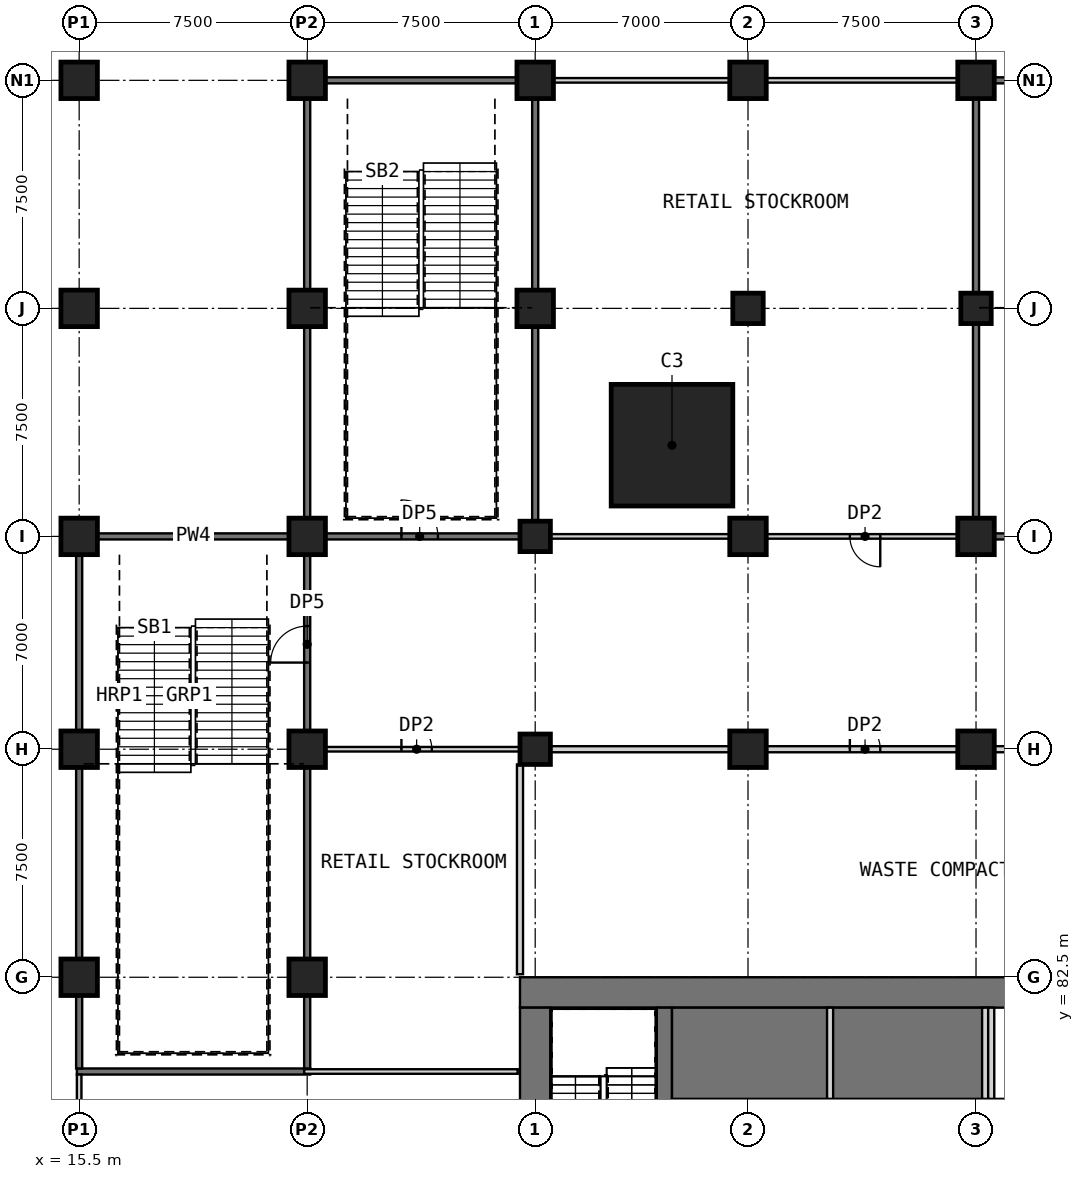
"""IFC4 building model, lengths in metres.
Left out: names, types, materials, properties, quantities, classifications, styles, units other than length and angle.
Written with IfcOpenShell. Run it as: python <this file> out.ifc"""

import sys

from ifc_helpers import new_model, si_unit, direction, frame, frame_2d, origin, origin_2d, place, context, subcontext, project, spatial, rectangle, extrude, element, fill, save


model = new_model("IFC4")
c1 = context("Model", 3, precision=1e-05, world=origin(), true_north=direction((0.0, 1.0)))
c2 = subcontext(c1, "Body", "Model", "MODEL_VIEW")
j1 = project(units=[si_unit("LENGTHUNIT", "METRE"), si_unit("PLANEANGLEUNIT", "RADIAN")], contexts=[c1])
p1 = place(None, origin())
s1 = spatial("IfcSite", under=j1, at=p1, CompositionType="ELEMENT")
p2 = place(p1, origin())
s2 = spatial("IfcBuilding", under=s1, at=p2, CompositionType="ELEMENT")
p3 = place(p2, frame((0.0, 0.0, -6.0)))
s3 = spatial("IfcBuildingStorey", under=s2, at=p3, CompositionType="ELEMENT", Elevation=-6.0)
for number, where, z_axis, x_axis in (
    (1, (30.5, 90.0, 0.0), (0.0, 0.0, 1.0), (1.0, 0.0, 0.0)),
    (2, (30.5, 97.0, 0.0), (0.0, 0.0, 1.0), (1.0, 0.0, 0.0)),
):
    element("IfcColumn", number, at=place(p3, frame(where, z_axis=z_axis, x_axis=x_axis)), inside=s3, PredefinedType="COLUMN", context=c2, shape_type="SweptSolid", body=[
        extrude(rectangle(XDim=1.0, YDim=1.0, at=origin_2d()), origin(), (0.0, 0.0, 1.0), 6.0),
    ])
for number, where, z_axis, x_axis in (
    (3, (37.5, 90.0, 0.0), (0.0, 0.0, 1.0), (1.0, 0.0, 0.0)),
    (4, (37.5, 97.0, 0.0), (0.0, 0.0, 1.0), (1.0, 0.0, 0.0)),
):
    element("IfcColumn", number, at=place(p3, frame(where, z_axis=z_axis, x_axis=x_axis)), inside=s3, PredefinedType="COLUMN", context=c2, shape_type="SweptSolid", body=[
        extrude(rectangle(XDim=1.2, YDim=1.2, at=origin_2d()), origin(), (0.0, 0.0, 1.0), 6.0),
    ])
p4 = place(p3, frame((37.5, 104.5, 0.0), z_axis=(0.0, 0.0, 1.0), x_axis=(1.0, 0.0, 0.0)))
e5 = element("IfcColumn", 5, at=p4, inside=s3, PredefinedType="COLUMN", context=c2, shape_type="SweptSolid", body=[
    extrude(rectangle(XDim=1.0, YDim=1.0, at=origin_2d()), origin(), (0.0, 0.0, 1.0), 6.0),
])
for number, where, z_axis, x_axis in (
    (6, (45.0, 90.0, 0.0), (0.0, 0.0, 1.0), (1.0, 0.0, 0.0)),
    (7, (45.0, 97.0, 0.0), (0.0, 0.0, 1.0), (1.0, 0.0, 0.0)),
):
    element("IfcColumn", number, at=place(p3, frame(where, z_axis=z_axis, x_axis=x_axis)), inside=s3, PredefinedType="COLUMN", context=c2, shape_type="SweptSolid", body=[
        extrude(rectangle(XDim=1.2, YDim=1.2, at=origin_2d()), origin(), (0.0, 0.0, 1.0), 6.0),
    ])
p5 = place(p3, frame((45.0, 104.5, 0.0), z_axis=(0.0, 0.0, 1.0), x_axis=(1.0, 0.0, 0.0)))
e8 = element("IfcColumn", 8, at=p5, inside=s3, PredefinedType="COLUMN", context=c2, shape_type="SweptSolid", body=[
    extrude(rectangle(XDim=1.0, YDim=1.0, at=origin_2d()), origin(), (0.0, 0.0, 1.0), 6.0),
])
p6 = place(p3, frame((35.0, 100.0, 0.0), z_axis=(0.0, 0.0, 1.0), x_axis=(1.0, 0.0, 0.0)))
e9 = element("IfcColumn", 9, at=p6, inside=s3, PredefinedType="COLUMN", context=c2, shape_type="SweptSolid", body=[
    extrude(rectangle(XDim=4.0, YDim=4.0, at=origin_2d()), origin(), (0.0, 0.0, 1.0), 6.0),
])
for number, where, z_axis, x_axis in (
    (10, (15.5, 82.5, 0.0), (0.0, 0.0, 1.0), (1.0, 0.0, 0.0)),
    (11, (15.5, 90.0, 0.0), (0.0, 0.0, 1.0), (1.0, 0.0, 0.0)),
    (12, (15.5, 97.0, 0.0), (0.0, 0.0, 1.0), (1.0, 0.0, 0.0)),
    (13, (15.5, 104.5, 0.0), (0.0, 0.0, 1.0), (1.0, 0.0, 0.0)),
    (14, (15.5, 112.0, 0.0), (0.0, 0.0, 1.0), (1.0, 0.0, 0.0)),
    (15, (23.0, 82.5, 0.0), (0.0, 0.0, 1.0), (1.0, 0.0, 0.0)),
    (16, (23.0, 90.0, 0.0), (0.0, 0.0, 1.0), (1.0, 0.0, 0.0)),
    (17, (23.0, 97.0, 0.0), (0.0, 0.0, 1.0), (1.0, 0.0, 0.0)),
    (18, (23.0, 104.5, 0.0), (0.0, 0.0, 1.0), (1.0, 0.0, 0.0)),
    (19, (23.0, 112.0, 0.0), (0.0, 0.0, 1.0), (1.0, 0.0, 0.0)),
    (20, (30.5, 104.5, 0.0), (0.0, 0.0, 1.0), (1.0, 0.0, 0.0)),
    (21, (30.5, 112.0, 0.0), (0.0, 0.0, 1.0), (1.0, 0.0, 0.0)),
    (22, (37.5, 112.0, 0.0), (0.0, 0.0, 1.0), (1.0, 0.0, 0.0)),
    (23, (45.0, 112.0, 0.0), (0.0, 0.0, 1.0), (1.0, 0.0, 0.0)),
):
    element("IfcColumn", number, at=place(p3, frame(where, z_axis=z_axis, x_axis=x_axis)), inside=s3, PredefinedType="COLUMN", context=c2, shape_type="SweptSolid", body=[
        extrude(rectangle(XDim=1.2, YDim=1.2, at=origin_2d()), origin(), (0.0, 0.0, 1.0), 6.0),
    ])
p7 = place(p3, frame((30.0, 82.0, 0.0), z_axis=(0.0, 0.0, 1.0), x_axis=(1.0, 0.0, 0.0)))
e24 = element("IfcWall", 24, at=p7, inside=s3, PredefinedType="SHEAR", context=c2, shape_type="SweptSolid", body=[
    extrude(rectangle(XDim=30.0, YDim=1.0, at=frame_2d((15.0, 0.0))), origin(), (0.0, 0.0, 1.0), 6.0),
])
p8 = place(p3, frame((30.5, 61.0, 0.0), z_axis=(0.0, 0.0, 1.0), x_axis=(0.0, 1.0, 0.0)))
e25 = element("IfcWall", 25, at=p8, inside=s3, PredefinedType="SHEAR", context=c2, shape_type="SweptSolid", body=[
    extrude(rectangle(XDim=20.5, YDim=1.0, at=frame_2d((10.25, 0.0))), origin(), (0.0, 0.0, 1.0), 6.0),
])
p9 = place(p3, frame((34.75, 78.3, 0.0), z_axis=(0.0, 0.0, 1.0), x_axis=(0.0, 1.0, 0.0)))
e26 = element("IfcWall", 26, at=p9, inside=s3, PredefinedType="SHEAR", context=c2, shape_type="SweptSolid", body=[
    extrude(rectangle(XDim=3.2, YDim=0.5, at=frame_2d((1.6, 0.0))), origin(), (0.0, 0.0, 1.0), 6.0),
])
p10 = place(p3, frame((35.0, 79.9, 0.0), z_axis=(0.0, 0.0, 1.0), x_axis=(1.0, 0.0, 0.0)))
e27 = element("IfcWall", 27, at=p10, inside=s3, PredefinedType="SOLIDWALL", context=c2, shape_type="SweptSolid", body=[
    extrude(rectangle(XDim=10.4, YDim=3.2, at=frame_2d((5.2, 0.0))), origin(), (0.0, 0.0, 1.0), 4.4),
])
p11 = place(p3, frame((35.0, 78.4, 4.4), z_axis=(0.0, 0.0, 1.0), x_axis=(1.0, 0.0, 0.0)))
e28 = element("IfcWall", 28, at=p11, inside=s3, PredefinedType="SOLIDWALL", context=c2, shape_type="SweptSolid", body=[
    extrude(rectangle(XDim=10.4, YDim=0.2, at=frame_2d((5.2, 0.0))), origin(), (0.0, 0.0, 1.0), 1.6),
])
for number, where, z_axis, x_axis in (
    (29, (40.2, 78.5, 4.4), (0.0, 0.0, 1.0), (0.0, 1.0, 0.0)),
    (30, (45.3, 78.5, 4.4), (0.0, 0.0, 1.0), (0.0, 1.0, 0.0)),
):
    element("IfcWall", number, at=place(p3, frame(where, z_axis=z_axis, x_axis=x_axis)), inside=s3, PredefinedType="SOLIDWALL", context=c2, shape_type="SweptSolid", body=[
        extrude(rectangle(XDim=3.0, YDim=0.2, at=frame_2d((1.5, 0.0))), origin(), (0.0, 0.0, 1.0), 1.6),
    ])
p12 = place(p3, frame((45.4, 78.4, 0.0), z_axis=(0.0, 0.0, 1.0), x_axis=(1.0, 0.0, 0.0)))
e31 = element("IfcWall", 31, at=p12, inside=s3, PredefinedType="SOLIDWALL", context=c2, shape_type="SweptSolid", body=[
    extrude(rectangle(XDim=5.2, YDim=0.2, at=frame_2d((2.6, 0.0))), origin(), (0.0, 0.0, 1.0), 6.0),
])
p13 = place(p12, frame((0.75, 0.0, 0.0)))
e32 = element("IfcOpeningElement", 32, at=p13, cuts=e31, PredefinedType="OPENING", context=c2, shape_type="SweptSolid", body=[
    extrude(rectangle(XDim=1.1, YDim=2.1, at=frame_2d((0.55, 1.05))), frame((0.0, 0.11, 0.0), z_axis=(0.0, -1.0, 0.0), x_axis=(1.0, 0.0, 0.0)), (0.0, 0.0, 1.0), 0.22),
])
p14 = place(p12, frame((3.35, 0.0, 0.0)))
e33 = element("IfcOpeningElement", 33, at=p14, cuts=e31, PredefinedType="OPENING", context=c2, shape_type="SweptSolid", body=[
    extrude(rectangle(XDim=1.1, YDim=2.1, at=frame_2d((0.55, 1.05))), frame((0.0, 0.11, 0.0), z_axis=(0.0, -1.0, 0.0), x_axis=(1.0, 0.0, 0.0)), (0.0, 0.0, 1.0), 0.22),
])
p15 = place(p3, frame((45.5, 78.5, 0.0), z_axis=(0.0, 0.0, 1.0), x_axis=(0.0, 1.0, 0.0)))
e34 = element("IfcWall", 34, at=p15, inside=s3, PredefinedType="SOLIDWALL", context=c2, shape_type="SweptSolid", body=[
    extrude(rectangle(XDim=3.0, YDim=0.2, at=frame_2d((1.5, 0.0))), origin(), (0.0, 0.0, 1.0), 6.0),
])
p16 = place(p3, frame((23.6, 90.0, 0.0), z_axis=(0.0, 0.0, 1.0), x_axis=(1.0, 0.0, 0.0)))
e35 = element("IfcWall", 35, at=p16, inside=s3, PredefinedType="PARTITIONING", context=c2, shape_type="SweptSolid", body=[
    extrude(rectangle(XDim=6.4, YDim=0.15, at=frame_2d((3.2, 0.0))), origin(), (0.0, 0.0, 1.0), 5.7),
])
p17 = place(p16, frame((2.5, 0.0, 0.0)))
e36 = element("IfcOpeningElement", 36, at=p17, cuts=e35, PredefinedType="OPENING", context=c2, shape_type="SweptSolid", body=[
    extrude(rectangle(XDim=1.0, YDim=2.1, at=frame_2d((0.5, 1.05))), frame((0.0, 0.085, 0.0), z_axis=(0.0, -1.0, 0.0), x_axis=(1.0, 0.0, 0.0)), (0.0, 0.0, 1.0), 0.17),
])
p18 = place(p3, frame((31.0, 90.0, 0.0), z_axis=(0.0, 0.0, 1.0), x_axis=(1.0, 0.0, 0.0)))
e37 = element("IfcWall", 37, at=p18, inside=s3, PredefinedType="PARTITIONING", context=c2, shape_type="SweptSolid", body=[
    extrude(rectangle(XDim=5.9, YDim=0.2, at=frame_2d((2.95, 0.0))), origin(), (0.0, 0.0, 1.0), 5.7),
])
p19 = place(p3, frame((38.1, 90.0, 0.0), z_axis=(0.0, 0.0, 1.0), x_axis=(1.0, 0.0, 0.0)))
e38 = element("IfcWall", 38, at=p19, inside=s3, PredefinedType="PARTITIONING", context=c2, shape_type="SweptSolid", body=[
    extrude(rectangle(XDim=6.3, YDim=0.2, at=frame_2d((3.15, 0.0))), origin(), (0.0, 0.0, 1.0), 5.7),
])
p20 = place(p19, frame((2.75, 0.0, 0.0)))
e39 = element("IfcOpeningElement", 39, at=p20, cuts=e38, PredefinedType="OPENING", context=c2, shape_type="SweptSolid", body=[
    extrude(rectangle(XDim=1.0, YDim=2.1, at=frame_2d((0.5, 1.05))), frame((0.0, 0.11, 0.0), z_axis=(0.0, -1.0, 0.0), x_axis=(1.0, 0.0, 0.0)), (0.0, 0.0, 1.0), 0.22),
])
p21 = place(p3, frame((45.6, 90.0, 0.0), z_axis=(0.0, 0.0, 1.0), x_axis=(1.0, 0.0, 0.0)))
e40 = element("IfcWall", 40, at=p21, inside=s3, PredefinedType="PARTITIONING", context=c2, shape_type="SweptSolid", body=[
    extrude(rectangle(XDim=6.3, YDim=0.2, at=frame_2d((3.15, 0.0))), origin(), (0.0, 0.0, 1.0), 5.7),
])
p22 = place(p3, frame((16.1, 97.0, 0.0), z_axis=(0.0, 0.0, 1.0), x_axis=(1.0, 0.0, 0.0)))
e41 = element("IfcWall", 41, at=p22, inside=s3, PredefinedType="SHEAR", context=c2, shape_type="SweptSolid", body=[
    extrude(rectangle(XDim=6.3, YDim=0.2, at=frame_2d((3.15, 0.0))), origin(), (0.0, 0.0, 1.0), 5.7),
])
p23 = place(p3, frame((23.6, 97.0, 0.0), z_axis=(0.0, 0.0, 1.0), x_axis=(1.0, 0.0, 0.0)))
e42 = element("IfcWall", 42, at=p23, inside=s3, PredefinedType="SHEAR", context=c2, shape_type="SweptSolid", body=[
    extrude(rectangle(XDim=6.4, YDim=0.2, at=frame_2d((3.2, 0.0))), origin(), (0.0, 0.0, 1.0), 5.7),
])
p24 = place(p23, frame((2.5, 0.0, 0.0)))
e43 = element("IfcOpeningElement", 43, at=p24, cuts=e42, PredefinedType="OPENING", context=c2, shape_type="SweptSolid", body=[
    extrude(rectangle(XDim=1.2, YDim=2.1, at=frame_2d((0.6, 1.05))), frame((0.0, 0.11, 0.0), z_axis=(0.0, -1.0, 0.0), x_axis=(1.0, 0.0, 0.0)), (0.0, 0.0, 1.0), 0.22),
])
p25 = place(p3, frame((31.0, 97.0, 0.0), z_axis=(0.0, 0.0, 1.0), x_axis=(1.0, 0.0, 0.0)))
e44 = element("IfcWall", 44, at=p25, inside=s3, PredefinedType="PARTITIONING", context=c2, shape_type="SweptSolid", body=[
    extrude(rectangle(XDim=5.9, YDim=0.15, at=frame_2d((2.95, 0.0))), origin(), (0.0, 0.0, 1.0), 5.7),
])
p26 = place(p3, frame((44.4, 97.0, 0.0), z_axis=(0.0, 0.0, 1.0), x_axis=(-1.0, 0.0, 0.0)))
e45 = element("IfcWall", 45, at=p26, inside=s3, PredefinedType="PARTITIONING", context=c2, shape_type="SweptSolid", body=[
    extrude(rectangle(XDim=6.3, YDim=0.15, at=frame_2d((3.15, 0.0))), origin(), (0.0, 0.0, 1.0), 5.7),
])
p27 = place(p26, frame((2.55, 0.0, 0.0)))
e46 = element("IfcOpeningElement", 46, at=p27, cuts=e45, PredefinedType="OPENING", context=c2, shape_type="SweptSolid", body=[
    extrude(rectangle(XDim=1.0, YDim=2.1, at=frame_2d((0.5, 1.05))), frame((0.0, 0.085, 0.0), z_axis=(0.0, -1.0, 0.0), x_axis=(1.0, 0.0, 0.0)), (0.0, 0.0, 1.0), 0.17),
])
p28 = place(p3, frame((45.6, 97.0, 0.0), z_axis=(0.0, 0.0, 1.0), x_axis=(1.0, 0.0, 0.0)))
e47 = element("IfcWall", 47, at=p28, inside=s3, PredefinedType="SHEAR", context=c2, shape_type="SweptSolid", body=[
    extrude(rectangle(XDim=6.3, YDim=0.2, at=frame_2d((3.15, 0.0))), origin(), (0.0, 0.0, 1.0), 5.7),
])
p29 = place(p28, frame((2.5, 0.0, 0.0)))
e48 = element("IfcOpeningElement", 48, at=p29, cuts=e47, PredefinedType="OPENING", context=c2, shape_type="SweptSolid", body=[
    extrude(rectangle(XDim=1.2, YDim=2.1, at=frame_2d((0.6, 1.05))), frame((0.0, 0.11, 0.0), z_axis=(0.0, -1.0, 0.0), x_axis=(1.0, 0.0, 0.0)), (0.0, 0.0, 1.0), 0.22),
])
p30 = place(p3, frame((15.425, 79.4, 0.0), z_axis=(0.0, 0.0, 1.0), x_axis=(1.0, 0.0, 0.0)))
e49 = element("IfcWall", 49, at=p30, inside=s3, PredefinedType="SHEAR", context=c2, shape_type="SweptSolid", body=[
    extrude(rectangle(XDim=7.675, YDim=0.2, at=frame_2d((3.837, 0.0))), origin(), (0.0, 0.0, 1.0), 5.1),
])
p31 = place(p3, frame((22.9, 79.4, 0.0), z_axis=(0.0, 0.0, 1.0), x_axis=(1.0, 0.0, 0.0)))
e50 = element("IfcWall", 50, at=p31, inside=s3, PredefinedType="PARTITIONING", context=c2, shape_type="SweptSolid", body=[
    extrude(rectangle(XDim=7.025, YDim=0.15, at=frame_2d((3.513, 0.0))), origin(), (0.0, 0.0, 1.0), 5.7),
])
p32 = place(p3, frame((23.6, 112.0, 0.0), z_axis=(0.0, 0.0, 1.0), x_axis=(1.0, 0.0, 0.0)))
e51 = element("IfcWall", 51, at=p32, inside=s3, PredefinedType="SHEAR", context=c2, shape_type="SweptSolid", body=[
    extrude(rectangle(XDim=6.3, YDim=0.2, at=frame_2d((3.15, 0.0))), origin(), (0.0, 0.0, 1.0), 5.1),
])
p33 = place(p3, frame((31.1, 112.0, 0.0), z_axis=(0.0, 0.0, 1.0), x_axis=(1.0, 0.0, 0.0)))
e52 = element("IfcWall", 52, at=p33, inside=s3, PredefinedType="PARTITIONING", context=c2, shape_type="SweptSolid", body=[
    extrude(rectangle(XDim=5.8, YDim=0.15, at=frame_2d((2.9, 0.0))), origin(), (0.0, 0.0, 1.0), 5.1),
])
p34 = place(p3, frame((38.1, 112.0, 0.0), z_axis=(0.0, 0.0, 1.0), x_axis=(1.0, 0.0, 0.0)))
e53 = element("IfcWall", 53, at=p34, inside=s3, PredefinedType="PARTITIONING", context=c2, shape_type="SweptSolid", body=[
    extrude(rectangle(XDim=6.3, YDim=0.15, at=frame_2d((3.15, 0.0))), origin(), (0.0, 0.0, 1.0), 5.1),
])
p35 = place(p3, frame((45.6, 112.0, 0.0), z_axis=(0.0, 0.0, 1.0), x_axis=(1.0, 0.0, 0.0)))
e54 = element("IfcWall", 54, at=p35, inside=s3, PredefinedType="SHEAR", context=c2, shape_type="SweptSolid", body=[
    extrude(rectangle(XDim=6.3, YDim=0.2, at=frame_2d((3.15, 0.0))), origin(), (0.0, 0.0, 1.0), 5.1),
])
p36 = place(p3, frame((15.5, 75.6, 0.0), z_axis=(0.0, 0.0, 1.0), x_axis=(0.0, 1.0, 0.0)))
e55 = element("IfcWall", 55, at=p36, inside=s3, PredefinedType="PARTITIONING", context=c2, shape_type="SweptSolid", body=[
    extrude(rectangle(XDim=3.7, YDim=0.15, at=frame_2d((1.85, 0.0))), origin(), (0.0, 0.0, 1.0), 5.1),
])
p37 = place(p3, frame((15.5, 79.5, 0.0), z_axis=(0.0, 0.0, 1.0), x_axis=(0.0, 1.0, 0.0)))
e56 = element("IfcWall", 56, at=p37, inside=s3, PredefinedType="SHEAR", context=c2, shape_type="SweptSolid", body=[
    extrude(rectangle(XDim=2.4, YDim=0.2, at=frame_2d((1.2, 0.0))), origin(), (0.0, 0.0, 1.0), 5.1),
])
p38 = place(p3, frame((15.5, 83.1, 0.0), z_axis=(0.0, 0.0, 1.0), x_axis=(0.0, 1.0, 0.0)))
e57 = element("IfcWall", 57, at=p38, inside=s3, PredefinedType="SHEAR", context=c2, shape_type="SweptSolid", body=[
    extrude(rectangle(XDim=6.3, YDim=0.2, at=frame_2d((3.15, 0.0))), origin(), (0.0, 0.0, 1.0), 5.1),
])
p39 = place(p3, frame((15.5, 90.6, 0.0), z_axis=(0.0, 0.0, 1.0), x_axis=(0.0, 1.0, 0.0)))
e58 = element("IfcWall", 58, at=p39, inside=s3, PredefinedType="SHEAR", context=c2, shape_type="SweptSolid", body=[
    extrude(rectangle(XDim=5.8, YDim=0.2, at=frame_2d((2.9, 0.0))), origin(), (0.0, 0.0, 1.0), 5.1),
])
p40 = place(p3, frame((23.0, 79.5, 0.0), z_axis=(0.0, 0.0, 1.0), x_axis=(0.0, 1.0, 0.0)))
e59 = element("IfcWall", 59, at=p40, inside=s3, PredefinedType="SHEAR", context=c2, shape_type="SweptSolid", body=[
    extrude(rectangle(XDim=2.4, YDim=0.2, at=frame_2d((1.2, 0.0))), origin(), (0.0, 0.0, 1.0), 5.7),
])
p41 = place(p3, frame((23.0, 83.1, 0.0), z_axis=(0.0, 0.0, 1.0), x_axis=(0.0, 1.0, 0.0)))
e60 = element("IfcWall", 60, at=p41, inside=s3, PredefinedType="SHEAR", context=c2, shape_type="SweptSolid", body=[
    extrude(rectangle(XDim=6.3, YDim=0.2, at=frame_2d((3.15, 0.0))), origin(), (0.0, 0.0, 1.0), 5.7),
])
p42 = place(p3, frame((23.0, 90.6, 0.0), z_axis=(0.0, 0.0, 1.0), x_axis=(0.0, 1.0, 0.0)))
e61 = element("IfcWall", 61, at=p42, inside=s3, PredefinedType="SHEAR", context=c2, shape_type="SweptSolid", body=[
    extrude(rectangle(XDim=5.8, YDim=0.2, at=frame_2d((2.9, 0.0))), origin(), (0.0, 0.0, 1.0), 5.7),
])
p43 = place(p42, frame((2.25, 0.0, 0.0)))
e62 = element("IfcOpeningElement", 62, at=p43, cuts=e61, PredefinedType="OPENING", context=c2, shape_type="SweptSolid", body=[
    extrude(rectangle(XDim=1.2, YDim=2.1, at=frame_2d((0.6, 1.05))), frame((0.0, 0.11, 0.0), z_axis=(0.0, -1.0, 0.0), x_axis=(1.0, 0.0, 0.0)), (0.0, 0.0, 1.0), 0.22),
])
for number, where, z_axis, x_axis in (
    (63, (23.0, 97.6, 0.0), (0.0, 0.0, 1.0), (0.0, 1.0, 0.0)),
    (64, (23.0, 105.1, 0.0), (0.0, 0.0, 1.0), (0.0, 1.0, 0.0)),
):
    element("IfcWall", number, at=place(p3, frame(where, z_axis=z_axis, x_axis=x_axis)), inside=s3, PredefinedType="SHEAR", context=c2, shape_type="SweptSolid", body=[
        extrude(rectangle(XDim=6.3, YDim=0.2, at=frame_2d((3.15, 0.0))), origin(), (0.0, 0.0, 1.0), 5.7),
    ])
p44 = place(p3, frame((30.5, 97.5, 0.0), z_axis=(0.0, 0.0, 1.0), x_axis=(0.0, 1.0, 0.0)))
e65 = element("IfcWall", 65, at=p44, inside=s3, PredefinedType="SHEAR", context=c2, shape_type="SweptSolid", body=[
    extrude(rectangle(XDim=6.4, YDim=0.2, at=frame_2d((3.2, 0.0))), origin(), (0.0, 0.0, 1.0), 5.7),
])
p45 = place(p3, frame((30.5, 105.1, 0.0), z_axis=(0.0, 0.0, 1.0), x_axis=(0.0, 1.0, 0.0)))
e66 = element("IfcWall", 66, at=p45, inside=s3, PredefinedType="SHEAR", context=c2, shape_type="SweptSolid", body=[
    extrude(rectangle(XDim=6.3, YDim=0.2, at=frame_2d((3.15, 0.0))), origin(), (0.0, 0.0, 1.0), 5.7),
])
for number, where, z_axis, x_axis in (
    (67, (45.0, 97.6, 0.0), (0.0, 0.0, 1.0), (0.0, 1.0, 0.0)),
    (68, (45.0, 105.0, 0.0), (0.0, 0.0, 1.0), (0.0, 1.0, 0.0)),
):
    element("IfcWall", number, at=place(p3, frame(where, z_axis=z_axis, x_axis=x_axis)), inside=s3, PredefinedType="SHEAR", context=c2, shape_type="SweptSolid", body=[
        extrude(rectangle(XDim=6.4, YDim=0.2, at=frame_2d((3.2, 0.0))), origin(), (0.0, 0.0, 1.0), 5.7),
    ])
p46 = place(p3, frame((30.0, 82.6, 0.0), z_axis=(0.0, 0.0, 1.0), x_axis=(0.0, 1.0, 0.0)))
e69 = element("IfcWall", 69, at=p46, inside=s3, PredefinedType="PARTITIONING", context=c2, shape_type="SweptSolid", body=[
    extrude(rectangle(XDim=6.9, YDim=0.2, at=frame_2d((3.45, 0.0))), origin(), (0.0, 0.0, 1.0), 5.7),
])
p47 = place(p17, origin())
e70 = element("IfcDoor", 70, at=p47, inside=s3, OperationType="SINGLE_SWING_LEFT", PredefinedType="DOOR", context=c2, shape_type="SweptSolid", body=[
    extrude(rectangle(XDim=1.0, YDim=2.1, at=frame_2d((0.5, 1.05))), frame((0.0, 0.025, 0.0), z_axis=(0.0, -1.0, 0.0), x_axis=(1.0, 0.0, 0.0)), (0.0, 0.0, 1.0), 0.05),
])
fill(e36, e70)
p48 = place(p20, origin())
e71 = element("IfcDoor", 71, at=p48, inside=s3, OperationType="SINGLE_SWING_LEFT", PredefinedType="DOOR", context=c2, shape_type="SweptSolid", body=[
    extrude(rectangle(XDim=1.0, YDim=2.1, at=frame_2d((0.5, 1.05))), frame((0.0, 0.025, 0.0), z_axis=(0.0, -1.0, 0.0), x_axis=(1.0, 0.0, 0.0)), (0.0, 0.0, 1.0), 0.05),
])
fill(e39, e71)
p49 = place(p24, origin())
e72 = element("IfcDoor", 72, at=p49, inside=s3, OperationType="SINGLE_SWING_LEFT", PredefinedType="DOOR", context=c2, shape_type="SweptSolid", body=[
    extrude(rectangle(XDim=1.2, YDim=2.1, at=frame_2d((0.6, 1.05))), frame((0.0, 0.025, 0.0), z_axis=(0.0, -1.0, 0.0), x_axis=(1.0, 0.0, 0.0)), (0.0, 0.0, 1.0), 0.05),
])
fill(e43, e72)
p50 = place(p27, origin())
e73 = element("IfcDoor", 73, at=p50, inside=s3, OperationType="SINGLE_SWING_LEFT", PredefinedType="DOOR", context=c2, shape_type="SweptSolid", body=[
    extrude(rectangle(XDim=1.0, YDim=2.1, at=frame_2d((0.5, 1.05))), frame((0.0, 0.025, 0.0), z_axis=(0.0, -1.0, 0.0), x_axis=(1.0, 0.0, 0.0)), (0.0, 0.0, 1.0), 0.05),
])
fill(e46, e73)
p51 = place(p43, origin())
e74 = element("IfcDoor", 74, at=p51, inside=s3, OperationType="SINGLE_SWING_LEFT", PredefinedType="DOOR", context=c2, shape_type="SweptSolid", body=[
    extrude(rectangle(XDim=1.2, YDim=2.1, at=frame_2d((0.6, 1.05))), frame((0.0, 0.025, 0.0), z_axis=(0.0, -1.0, 0.0), x_axis=(1.0, 0.0, 0.0)), (0.0, 0.0, 1.0), 0.05),
])
fill(e62, e74)
save(model, sys.argv[1])
